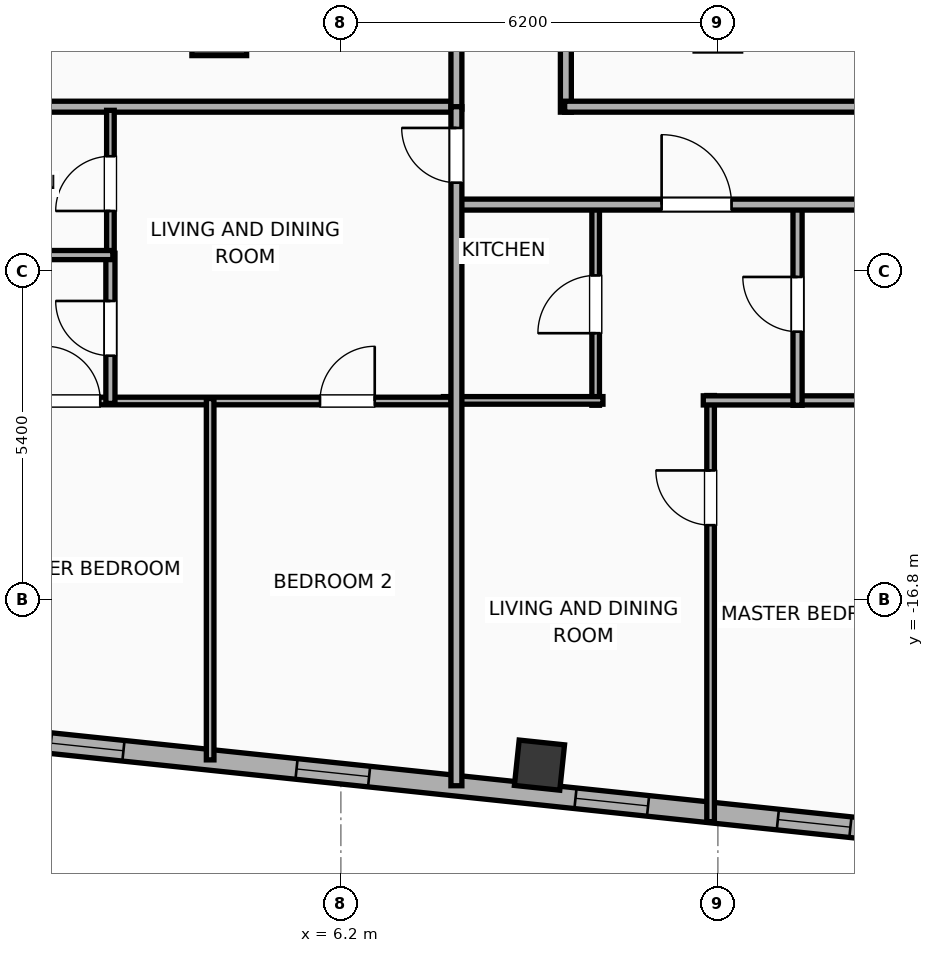
"""IFC4 building model, lengths in metres.
Left out: names, types, materials, properties, quantities, classifications, styles, units other than length and angle.
Written with IfcOpenShell. Run it as: python <this file> out.ifc"""

import sys

from ifc_helpers import new_model, si_unit, direction, frame, frame_2d, origin, origin_2d, place, context, subcontext, project, spatial, rectangle, hollow_rectangle, extrude, element, fill, save


model = new_model("IFC4")
c1 = context("Model", 3, precision=1e-05, world=origin(), true_north=direction((0.0, 1.0)))
c2 = subcontext(c1, "Body", "Model", "MODEL_VIEW")
j1 = project(units=[si_unit("LENGTHUNIT", "METRE"), si_unit("PLANEANGLEUNIT", "RADIAN")], contexts=[c1])
p1 = place(None, origin())
s1 = spatial("IfcSite", under=j1, at=p1, CompositionType="ELEMENT")
p2 = place(p1, origin())
s2 = spatial("IfcBuilding", under=s1, at=p2, CompositionType="ELEMENT")
p3 = place(p2, frame((0.0, 0.0, 267.8)))
s3 = spatial("IfcBuildingStorey", under=s2, at=p3, CompositionType="ELEMENT", Elevation=267.8)
p4 = place(p3, frame((4.2, -7.4, 0.0), z_axis=(0.0, 0.0, 1.0), x_axis=(1.0, 0.0, 0.0)))
e1 = element("IfcColumn", 1, at=p4, inside=s3, PredefinedType="COLUMN", context=c2, shape_type="SweptSolid", body=[
    extrude(rectangle(XDim=0.9, YDim=0.9, at=origin_2d()), origin(), (0.0, 0.0, 1.0), 3.9),
])
p5 = place(p3, frame((9.466, -19.518, 0.0), z_axis=(0.0, 0.0, 1.0), x_axis=(0.994521895368, -0.104528463268, 0.0)))
e2 = element("IfcColumn", 2, at=p5, inside=s3, PredefinedType="COLUMN", context=c2, shape_type="SweptSolid", body=[
    extrude(hollow_rectangle(XDim=0.75, YDim=0.75, WallThickness=0.025, at=origin_2d()), origin(), (0.0, 0.0, 1.0), 3.9),
])
p6 = place(p3, frame((18.708, -20.972, 0.0), z_axis=(0.0, 0.0, 1.0), x_axis=(-0.994521888554, 0.104528528102, 0.0)))
e3 = element("IfcWall", 3, at=p6, inside=s3, PredefinedType="ELEMENTEDWALL", context=c2, shape_type="SweptSolid", body=[
    extrude(rectangle(XDim=46.766, YDim=0.34, at=frame_2d((23.383, 0.0))), origin(), (0.0, 0.0, 1.0), 3.65),
])
p7 = place(p6, frame((23.833, 0.0, 0.75)))
e4 = element("IfcOpeningElement", 4, at=p7, cuts=e3, PredefinedType="OPENING", context=c2, shape_type="SweptSolid", body=[
    extrude(rectangle(XDim=2.4, YDim=2.1, at=frame_2d((1.2, 1.05))), frame((0.0, 0.18, 0.0), z_axis=(0.0, -1.0, 0.0), x_axis=(1.0, 0.0, 0.0)), (0.0, 0.0, 1.0), 0.36),
])
p8 = place(p6, frame((38.622, 0.0, 0.75)))
e5 = element("IfcOpeningElement", 5, at=p8, cuts=e3, PredefinedType="OPENING", context=c2, shape_type="SweptSolid", body=[
    extrude(rectangle(XDim=2.4, YDim=2.1, at=frame_2d((1.2, 1.05))), frame((0.0, 0.18, 0.0), z_axis=(0.0, -1.0, 0.0), x_axis=(1.0, 0.0, 0.0)), (0.0, 0.0, 1.0), 0.36),
])
p9 = place(p6, frame((44.402, 0.0, 0.75)))
e6 = element("IfcOpeningElement", 6, at=p9, cuts=e3, PredefinedType="OPENING", context=c2, shape_type="SweptSolid", body=[
    extrude(rectangle(XDim=1.2, YDim=2.05, at=frame_2d((0.6, 1.025))), frame((0.0, 0.18, 0.0), z_axis=(0.0, -1.0, 0.0), x_axis=(1.0, 0.0, 0.0)), (0.0, 0.0, 1.0), 0.36),
])
p10 = place(p6, frame((42.406, 0.0, 0.75)))
e7 = element("IfcOpeningElement", 7, at=p10, cuts=e3, PredefinedType="OPENING", context=c2, shape_type="SweptSolid", body=[
    extrude(rectangle(XDim=1.2, YDim=2.05, at=frame_2d((0.6, 1.025))), frame((0.0, 0.18, 0.0), z_axis=(0.0, -1.0, 0.0), x_axis=(1.0, 0.0, 0.0)), (0.0, 0.0, 1.0), 0.36),
])
p11 = place(p6, frame((34.933, 0.0, 0.75)))
e8 = element("IfcOpeningElement", 8, at=p11, cuts=e3, PredefinedType="OPENING", context=c2, shape_type="SweptSolid", body=[
    extrude(rectangle(XDim=1.2, YDim=2.05, at=frame_2d((0.6, 1.025))), frame((0.0, 0.18, 0.0), z_axis=(0.0, -1.0, 0.0), x_axis=(1.0, 0.0, 0.0)), (0.0, 0.0, 1.0), 0.36),
])
p12 = place(p6, frame((28.631, 0.0, 0.75)))
e9 = element("IfcOpeningElement", 9, at=p12, cuts=e3, PredefinedType="OPENING", context=c2, shape_type="SweptSolid", body=[
    extrude(rectangle(XDim=1.2, YDim=2.05, at=frame_2d((0.6, 1.025))), frame((0.0, 0.18, 0.0), z_axis=(0.0, -1.0, 0.0), x_axis=(1.0, 0.0, 0.0)), (0.0, 0.0, 1.0), 0.36),
])
p13 = place(p6, frame((30.896, 0.0, 0.75)))
e10 = element("IfcOpeningElement", 10, at=p13, cuts=e3, PredefinedType="OPENING", context=c2, shape_type="SweptSolid", body=[
    extrude(rectangle(XDim=1.2, YDim=2.05, at=frame_2d((0.6, 1.025))), frame((0.0, 0.18, 0.0), z_axis=(0.0, -1.0, 0.0), x_axis=(1.0, 0.0, 0.0)), (0.0, 0.0, 1.0), 0.36),
])
p14 = place(p6, frame((7.497, 0.0, 0.75)))
e11 = element("IfcOpeningElement", 11, at=p14, cuts=e3, PredefinedType="OPENING", context=c2, shape_type="SweptSolid", body=[
    extrude(rectangle(XDim=1.2, YDim=2.05, at=frame_2d((0.6, 1.025))), frame((0.0, 0.18, 0.0), z_axis=(0.0, -1.0, 0.0), x_axis=(1.0, 0.0, 0.0)), (0.0, 0.0, 1.0), 0.36),
])
p15 = place(p6, frame((4.151, 0.0, 0.75)))
e12 = element("IfcOpeningElement", 12, at=p15, cuts=e3, PredefinedType="OPENING", context=c2, shape_type="SweptSolid", body=[
    extrude(rectangle(XDim=1.2, YDim=2.05, at=frame_2d((0.6, 1.025))), frame((0.0, 0.18, 0.0), z_axis=(0.0, -1.0, 0.0), x_axis=(1.0, 0.0, 0.0)), (0.0, 0.0, 1.0), 0.36),
])
p16 = place(p6, frame((1.365, 0.0, 0.75)))
e13 = element("IfcOpeningElement", 13, at=p16, cuts=e3, PredefinedType="OPENING", context=c2, shape_type="SweptSolid", body=[
    extrude(rectangle(XDim=1.2, YDim=2.05, at=frame_2d((0.6, 1.025))), frame((0.0, 0.18, 0.0), z_axis=(0.0, -1.0, 0.0), x_axis=(1.0, 0.0, 0.0)), (0.0, 0.0, 1.0), 0.36),
])
p17 = place(p6, frame((20.254, 0.0, 0.75)))
e14 = element("IfcOpeningElement", 14, at=p17, cuts=e3, PredefinedType="OPENING", context=c2, shape_type="SweptSolid", body=[
    extrude(rectangle(XDim=1.2, YDim=2.05, at=frame_2d((0.6, 1.025))), frame((0.0, 0.18, 0.0), z_axis=(0.0, -1.0, 0.0), x_axis=(1.0, 0.0, 0.0)), (0.0, 0.0, 1.0), 0.36),
])
p18 = place(p6, frame((16.172, 0.0, 0.75)))
e15 = element("IfcOpeningElement", 15, at=p18, cuts=e3, PredefinedType="OPENING", context=c2, shape_type="SweptSolid", body=[
    extrude(rectangle(XDim=1.2, YDim=2.05, at=frame_2d((0.6, 1.025))), frame((0.0, 0.18, 0.0), z_axis=(0.0, -1.0, 0.0), x_axis=(1.0, 0.0, 0.0)), (0.0, 0.0, 1.0), 0.36),
])
p19 = place(p6, frame((12.11, 0.0, 0.75)))
e16 = element("IfcOpeningElement", 16, at=p19, cuts=e3, PredefinedType="OPENING", context=c2, shape_type="SweptSolid", body=[
    extrude(rectangle(XDim=1.2, YDim=2.05, at=frame_2d((0.6, 1.025))), frame((0.0, 0.18, 0.0), z_axis=(0.0, -1.0, 0.0), x_axis=(1.0, 0.0, 0.0)), (0.0, 0.0, 1.0), 0.36),
])
p20 = place(p3, frame((9.9, -8.78, 0.0), z_axis=(0.0, 0.0, 1.0), x_axis=(0.0, 1.0, 0.0)))
e17 = element("IfcWall", 17, at=p20, inside=s3, PredefinedType="PARTITIONING", context=c2, shape_type="SweptSolid", body=[
    extrude(rectangle(XDim=17.56, YDim=0.18, at=frame_2d((8.78, 0.0))), origin(), (0.0, 0.0, 1.0), 3.65),
])
p21 = place(p20, frame((7.352, 0.0, 0.0)))
e18 = element("IfcOpeningElement", 18, at=p21, cuts=e17, PredefinedType="OPENING", context=c2, shape_type="SweptSolid", body=[
    extrude(rectangle(XDim=1.1, YDim=2.05, at=frame_2d((0.55, 1.025))), frame((0.0, 0.1, 0.0), z_axis=(0.0, -1.0, 0.0), x_axis=(1.0, 0.0, 0.0)), (0.0, 0.0, 1.0), 0.2),
])
p22 = place(p3, frame((9.88, -8.69, 0.0), z_axis=(0.0, 0.0, 1.0), x_axis=(1.0, 0.0, 0.0)))
e19 = element("IfcWall", 19, at=p22, inside=s3, PredefinedType="PARTITIONING", context=c2, shape_type="SweptSolid", body=[
    extrude(rectangle(XDim=13.584, YDim=0.18, at=frame_2d((6.792, 0.0))), origin(), (0.0, 0.0, 1.0), 3.65),
])
p23 = place(p3, frame((-8.15, -8.69, 0.0), z_axis=(0.0, 0.0, 1.0), x_axis=(1.0, 0.0, 0.0)))
e20 = element("IfcWall", 20, at=p23, inside=s3, PredefinedType="PARTITIONING", context=c2, shape_type="SweptSolid", body=[
    extrude(rectangle(XDim=16.3, YDim=0.18, at=frame_2d((8.15, 0.0))), origin(), (0.0, 0.0, 1.0), 3.65),
])
p24 = place(p3, frame((8.1, -8.73, 0.0), z_axis=(0.0, 0.0, 1.0), x_axis=(0.0, 1.0, 0.0)))
e21 = element("IfcWall", 21, at=p24, inside=s3, PredefinedType="PARTITIONING", context=c2, shape_type="SweptSolid", body=[
    extrude(rectangle(XDim=17.46, YDim=0.18, at=frame_2d((8.73, 0.0))), origin(), (0.0, 0.0, 1.0), 3.65),
])
p25 = place(p3, frame((12.28, -20.448, 0.0), z_axis=(0.0, 0.0, 1.0), x_axis=(0.0, 1.0, 0.0)))
e22 = element("IfcWall", 22, at=p25, inside=s3, PredefinedType="PARTITIONING", context=c2, shape_type="SweptSolid", body=[
    extrude(rectangle(XDim=7.008, YDim=0.125, at=frame_2d((3.504, 0.0))), origin(), (0.0, 0.0, 1.0), 3.65),
])
p26 = place(p25, frame((4.875, 0.0, 0.0)))
e23 = element("IfcOpeningElement", 23, at=p26, cuts=e22, PredefinedType="OPENING", context=c2, shape_type="SweptSolid", body=[
    extrude(rectangle(XDim=0.9, YDim=2.05, at=frame_2d((0.45, 1.025))), frame((0.0, 0.073, 0.0), z_axis=(0.0, -1.0, 0.0), x_axis=(1.0, 0.0, 0.0)), (0.0, 0.0, 1.0), 0.145),
])
p27 = place(p3, frame((12.16, -13.52, 0.0), z_axis=(0.0, 0.0, 1.0), x_axis=(1.0, 0.0, 0.0)))
e24 = element("IfcWall", 24, at=p27, inside=s3, PredefinedType="PLUMBINGWALL", context=c2, shape_type="SweptSolid", body=[
    extrude(rectangle(XDim=3.605, YDim=0.15, at=frame_2d((1.802, 0.0))), origin(), (0.0, 0.0, 1.0), 3.65),
])
p28 = place(p3, frame((10.39, -13.6, 0.0), z_axis=(0.0, 0.0, 1.0), x_axis=(0.0, 1.0, 0.0)))
e25 = element("IfcWall", 25, at=p28, inside=s3, PredefinedType="PARTITIONING", context=c2, shape_type="SweptSolid", body=[
    extrude(rectangle(XDim=3.32, YDim=0.125, at=frame_2d((1.66, 0.0))), origin(), (0.0, 0.0, 1.0), 3.65),
])
p29 = place(p28, frame((1.185, 0.0, 0.0)))
e26 = element("IfcOpeningElement", 26, at=p29, cuts=e25, PredefinedType="OPENING", context=c2, shape_type="SweptSolid", body=[
    extrude(rectangle(XDim=0.95, YDim=2.05, at=frame_2d((0.475, 1.025))), frame((0.0, 0.073, 0.0), z_axis=(0.0, -1.0, 0.0), x_axis=(1.0, 0.0, 0.0)), (0.0, 0.0, 1.0), 0.145),
])
p30 = place(p3, frame((7.887, -13.52, 0.0), z_axis=(0.0, 0.0, 1.0), x_axis=(1.0, 0.0, 0.0)))
e27 = element("IfcWall", 27, at=p30, inside=s3, PredefinedType="PARTITIONING", context=c2, shape_type="SweptSolid", body=[
    extrude(rectangle(XDim=2.623, YDim=0.125, at=frame_2d((1.311, 0.0))), origin(), (0.0, 0.0, 1.0), 3.65),
])
p31 = place(p3, frame((13.71, -13.6, 0.0), z_axis=(0.0, 0.0, 1.0), x_axis=(0.0, 1.0, 0.0)))
e28 = element("IfcWall", 28, at=p31, inside=s3, PredefinedType="PLUMBINGWALL", context=c2, shape_type="SweptSolid", body=[
    extrude(rectangle(XDim=3.32, YDim=0.15, at=frame_2d((1.66, 0.0))), origin(), (0.0, 0.0, 1.0), 3.65),
])
p32 = place(p31, frame((1.21, 0.0, 0.0)))
e29 = element("IfcOpeningElement", 29, at=p32, cuts=e28, PredefinedType="OPENING", context=c2, shape_type="SweptSolid", body=[
    extrude(rectangle(XDim=0.9, YDim=2.05, at=frame_2d((0.45, 1.025))), frame((0.0, 0.085, 0.0), z_axis=(0.0, -1.0, 0.0), x_axis=(1.0, 0.0, 0.0)), (0.0, 0.0, 1.0), 0.17),
])
p33 = place(p3, frame((8.08, -10.3, 0.0), z_axis=(0.0, 0.0, 1.0), x_axis=(1.0, 0.0, 0.0)))
e30 = element("IfcWall", 30, at=p33, inside=s3, PredefinedType="PARTITIONING", context=c2, shape_type="SweptSolid", body=[
    extrude(rectangle(XDim=15.215, YDim=0.18, at=frame_2d((7.607, 0.0))), origin(), (0.0, 0.0, 1.0), 3.65),
])
p34 = place(p33, frame((3.395, 0.0, 0.0)))
e31 = element("IfcOpeningElement", 31, at=p34, cuts=e30, PredefinedType="OPENING", context=c2, shape_type="SweptSolid", body=[
    extrude(rectangle(XDim=1.15, YDim=2.05, at=frame_2d((0.575, 1.025))), frame((0.0, 0.1, 0.0), z_axis=(0.0, -1.0, 0.0), x_axis=(1.0, 0.0, 0.0)), (0.0, 0.0, 1.0), 0.2),
])
p35 = place(p33, frame((11.036, 0.0, 0.0)))
e32 = element("IfcOpeningElement", 32, at=p35, cuts=e30, PredefinedType="OPENING", context=c2, shape_type="SweptSolid", body=[
    extrude(rectangle(XDim=1.15, YDim=2.05, at=frame_2d((0.575, 1.025))), frame((0.0, 0.1, 0.0), z_axis=(0.0, -1.0, 0.0), x_axis=(1.0, 0.0, 0.0)), (0.0, 0.0, 1.0), 0.2),
])
p36 = place(p3, frame((0.02, -13.53, 0.0), z_axis=(0.0, 0.0, 1.0), x_axis=(1.0, 0.0, 0.0)))
e33 = element("IfcWall", 33, at=p36, inside=s3, PredefinedType="PARTITIONING", context=c2, shape_type="SweptSolid", body=[
    extrude(rectangle(XDim=7.992, YDim=0.125, at=frame_2d((3.996, 0.0))), origin(), (0.0, 0.0, 1.0), 3.65),
])
p37 = place(p36, frame((1.323, 0.0, 0.0)))
e34 = element("IfcOpeningElement", 34, at=p37, cuts=e33, PredefinedType="OPENING", context=c2, shape_type="SweptSolid", body=[
    extrude(rectangle(XDim=0.9, YDim=2.05, at=frame_2d((0.45, 1.025))), frame((0.0, 0.073, 0.0), z_axis=(0.0, -1.0, 0.0), x_axis=(1.0, 0.0, 0.0)), (0.0, 0.0, 1.0), 0.145),
])
p38 = place(p36, frame((5.837, 0.0, 0.0)))
e35 = element("IfcOpeningElement", 35, at=p38, cuts=e33, PredefinedType="OPENING", context=c2, shape_type="SweptSolid", body=[
    extrude(rectangle(XDim=0.9, YDim=2.05, at=frame_2d((0.45, 1.025))), frame((0.0, 0.073, 0.0), z_axis=(0.0, -1.0, 0.0), x_axis=(1.0, 0.0, 0.0)), (0.0, 0.0, 1.0), 0.145),
])
p39 = place(p3, frame((2.41, -11.16, 0.0), z_axis=(0.0, 0.0, 1.0), x_axis=(0.0, 1.0, 0.0)))
e36 = element("IfcWall", 36, at=p39, inside=s3, PredefinedType="PARTITIONING", context=c2, shape_type="SweptSolid", body=[
    extrude(rectangle(XDim=2.41, YDim=0.125, at=frame_2d((1.205, 0.0))), origin(), (0.0, 0.0, 1.0), 3.65),
])
p40 = place(p39, frame((0.755, 0.0, 0.0)))
e37 = element("IfcOpeningElement", 37, at=p40, cuts=e36, PredefinedType="OPENING", context=c2, shape_type="SweptSolid", body=[
    extrude(rectangle(XDim=0.9, YDim=2.05, at=frame_2d((0.45, 1.025))), frame((0.0, 0.073, 0.0), z_axis=(0.0, -1.0, 0.0), x_axis=(1.0, 0.0, 0.0)), (0.0, 0.0, 1.0), 0.145),
])
p41 = place(p3, frame((2.41, -13.57, 0.0), z_axis=(0.0, 0.0, 1.0), x_axis=(0.0, 1.0, 0.0)))
e38 = element("IfcWall", 38, at=p41, inside=s3, PredefinedType="PLUMBINGWALL", context=c2, shape_type="SweptSolid", body=[
    extrude(rectangle(XDim=2.47, YDim=0.15, at=frame_2d((1.235, 0.0))), origin(), (0.0, 0.0, 1.0), 3.09),
])
p42 = place(p41, frame((0.785, 0.0, 0.0)))
e39 = element("IfcOpeningElement", 39, at=p42, cuts=e38, PredefinedType="OPENING", context=c2, shape_type="SweptSolid", body=[
    extrude(rectangle(XDim=0.9, YDim=2.05, at=frame_2d((0.45, 1.025))), frame((0.0, 0.085, 0.0), z_axis=(0.0, -1.0, 0.0), x_axis=(1.0, 0.0, 0.0)), (0.0, 0.0, 1.0), 0.17),
])
p43 = place(p3, frame((0.02, -11.13, 0.0), z_axis=(0.0, 0.0, 1.0), x_axis=(1.0, 0.0, 0.0)))
e40 = element("IfcWall", 40, at=p43, inside=s3, PredefinedType="PLUMBINGWALL", context=c2, shape_type="SweptSolid", body=[
    extrude(rectangle(XDim=2.43, YDim=0.15, at=frame_2d((1.215, 0.0))), origin(), (0.0, 0.0, 1.0), 3.65),
])
p44 = place(p3, frame((4.05, -19.432, 0.0), z_axis=(0.0, 0.0, 1.0), x_axis=(0.0, 1.0, 0.0)))
e41 = element("IfcWall", 41, at=p44, inside=s3, PredefinedType="PARTITIONING", context=c2, shape_type="SweptSolid", body=[
    extrude(rectangle(XDim=5.942, YDim=0.125, at=frame_2d((2.971, 0.0))), origin(), (0.0, 0.0, 1.0), 3.65),
])
p45 = place(p3, frame((8.1, -19.857, 0.0), z_axis=(0.0, 0.0, 1.0), x_axis=(0.0, 1.0, 0.0)))
e42 = element("IfcWall", 42, at=p45, inside=s3, PredefinedType="PARTITIONING", context=c2, shape_type="SweptSolid", body=[
    extrude(rectangle(XDim=11.167, YDim=0.18, at=frame_2d((5.583, 0.0))), origin(), (0.0, 0.0, 1.0), 3.65),
])
p46 = place(p45, frame((9.917, 0.0, 0.0)))
e43 = element("IfcOpeningElement", 43, at=p46, cuts=e42, PredefinedType="OPENING", context=c2, shape_type="SweptSolid", body=[
    extrude(rectangle(XDim=0.9, YDim=2.05, at=frame_2d((0.45, 1.025))), frame((0.0, 0.1, 0.0), z_axis=(0.0, -1.0, 0.0), x_axis=(1.0, 0.0, 0.0)), (0.0, 0.0, 1.0), 0.2),
])
p47 = place(p14, origin())
e44 = element("IfcWindow", 44, at=p47, inside=s3, PartitioningType="SINGLE_PANEL", PredefinedType="WINDOW", context=c2, shape_type="SweptSolid", body=[
    extrude(rectangle(XDim=1.2, YDim=2.05, at=frame_2d((0.6, 1.025))), frame((0.0, 0.03, 0.0), z_axis=(0.0, -1.0, 0.0), x_axis=(1.0, 0.0, 0.0)), (0.0, 0.0, 1.0), 0.06),
])
fill(e11, e44)
p48 = place(p15, origin())
e45 = element("IfcWindow", 45, at=p48, inside=s3, PartitioningType="SINGLE_PANEL", PredefinedType="WINDOW", context=c2, shape_type="SweptSolid", body=[
    extrude(rectangle(XDim=1.2, YDim=2.05, at=frame_2d((0.6, 1.025))), frame((0.0, 0.03, 0.0), z_axis=(0.0, -1.0, 0.0), x_axis=(1.0, 0.0, 0.0)), (0.0, 0.0, 1.0), 0.06),
])
fill(e12, e45)
p49 = place(p18, origin())
e46 = element("IfcWindow", 46, at=p49, inside=s3, PartitioningType="SINGLE_PANEL", PredefinedType="WINDOW", context=c2, shape_type="SweptSolid", body=[
    extrude(rectangle(XDim=1.2, YDim=2.05, at=frame_2d((0.6, 1.025))), frame((0.0, 0.03, 0.0), z_axis=(0.0, -1.0, 0.0), x_axis=(1.0, 0.0, 0.0)), (0.0, 0.0, 1.0), 0.06),
])
fill(e15, e46)
p50 = place(p19, origin())
e47 = element("IfcWindow", 47, at=p50, inside=s3, PartitioningType="SINGLE_PANEL", PredefinedType="WINDOW", context=c2, shape_type="SweptSolid", body=[
    extrude(rectangle(XDim=1.2, YDim=2.05, at=frame_2d((0.6, 1.025))), frame((0.0, 0.03, 0.0), z_axis=(0.0, -1.0, 0.0), x_axis=(1.0, 0.0, 0.0)), (0.0, 0.0, 1.0), 0.06),
])
fill(e16, e47)
p51 = place(p26, origin())
e48 = element("IfcDoor", 48, at=p51, inside=s3, OperationType="SINGLE_SWING_RIGHT", PredefinedType="DOOR", context=c2, shape_type="SweptSolid", body=[
    extrude(rectangle(XDim=0.9, YDim=2.05, at=frame_2d((0.45, 1.025))), frame((0.0, 0.025, 0.0), z_axis=(0.0, -1.0, 0.0), x_axis=(1.0, 0.0, 0.0)), (0.0, 0.0, 1.0), 0.05),
])
fill(e23, e48)
p52 = place(p29, origin())
e49 = element("IfcDoor", 49, at=p52, inside=s3, OperationType="SINGLE_SWING_LEFT", PredefinedType="DOOR", context=c2, shape_type="SweptSolid", body=[
    extrude(rectangle(XDim=0.95, YDim=2.05, at=frame_2d((0.475, 1.025))), frame((0.0, 0.025, 0.0), z_axis=(0.0, -1.0, 0.0), x_axis=(1.0, 0.0, 0.0)), (0.0, 0.0, 1.0), 0.05),
])
fill(e26, e49)
p53 = place(p32, origin())
e50 = element("IfcDoor", 50, at=p53, inside=s3, OperationType="SINGLE_SWING_RIGHT", PredefinedType="DOOR", context=c2, shape_type="SweptSolid", body=[
    extrude(rectangle(XDim=0.9, YDim=2.05, at=frame_2d((0.45, 1.025))), frame((0.0, 0.025, 0.0), z_axis=(0.0, -1.0, 0.0), x_axis=(1.0, 0.0, 0.0)), (0.0, 0.0, 1.0), 0.05),
])
fill(e29, e50)
p54 = place(p34, origin())
e51 = element("IfcDoor", 51, at=p54, inside=s3, OperationType="SINGLE_SWING_LEFT", PredefinedType="DOOR", context=c2, shape_type="SweptSolid", body=[
    extrude(rectangle(XDim=1.15, YDim=2.05, at=frame_2d((0.575, 1.025))), frame((0.0, 0.025, 0.0), z_axis=(0.0, -1.0, 0.0), x_axis=(1.0, 0.0, 0.0)), (0.0, 0.0, 1.0), 0.05),
])
fill(e31, e51)
p55 = place(p37, origin())
e52 = element("IfcDoor", 52, at=p55, inside=s3, OperationType="SINGLE_SWING_LEFT", PredefinedType="DOOR", context=c2, shape_type="SweptSolid", body=[
    extrude(rectangle(XDim=0.9, YDim=2.05, at=frame_2d((0.45, 1.025))), frame((0.0, 0.025, 0.0), z_axis=(0.0, -1.0, 0.0), x_axis=(1.0, 0.0, 0.0)), (0.0, 0.0, 1.0), 0.05),
])
fill(e34, e52)
p56 = place(p38, origin())
e53 = element("IfcDoor", 53, at=p56, inside=s3, OperationType="SINGLE_SWING_RIGHT", PredefinedType="DOOR", context=c2, shape_type="SweptSolid", body=[
    extrude(rectangle(XDim=0.9, YDim=2.05, at=frame_2d((0.45, 1.025))), frame((0.0, 0.025, 0.0), z_axis=(0.0, -1.0, 0.0), x_axis=(1.0, 0.0, 0.0)), (0.0, 0.0, 1.0), 0.05),
])
fill(e35, e53)
p57 = place(p40, origin())
e54 = element("IfcDoor", 54, at=p57, inside=s3, OperationType="SINGLE_SWING_LEFT", PredefinedType="DOOR", context=c2, shape_type="SweptSolid", body=[
    extrude(rectangle(XDim=0.9, YDim=2.05, at=frame_2d((0.45, 1.025))), frame((0.0, 0.025, 0.0), z_axis=(0.0, -1.0, 0.0), x_axis=(1.0, 0.0, 0.0)), (0.0, 0.0, 1.0), 0.05),
])
fill(e37, e54)
p58 = place(p42, origin())
e55 = element("IfcDoor", 55, at=p58, inside=s3, OperationType="SINGLE_SWING_RIGHT", PredefinedType="DOOR", context=c2, shape_type="SweptSolid", body=[
    extrude(rectangle(XDim=0.9, YDim=2.05, at=frame_2d((0.45, 1.025))), frame((0.0, 0.025, 0.0), z_axis=(0.0, -1.0, 0.0), x_axis=(1.0, 0.0, 0.0)), (0.0, 0.0, 1.0), 0.05),
])
fill(e39, e55)
p59 = place(p46, origin())
e56 = element("IfcDoor", 56, at=p59, inside=s3, OperationType="SINGLE_SWING_RIGHT", PredefinedType="DOOR", context=c2, shape_type="SweptSolid", body=[
    extrude(rectangle(XDim=0.9, YDim=2.05, at=frame_2d((0.45, 1.025))), frame((0.0, 0.025, 0.0), z_axis=(0.0, -1.0, 0.0), x_axis=(1.0, 0.0, 0.0)), (0.0, 0.0, 1.0), 0.05),
])
fill(e43, e56)
save(model, sys.argv[1])
